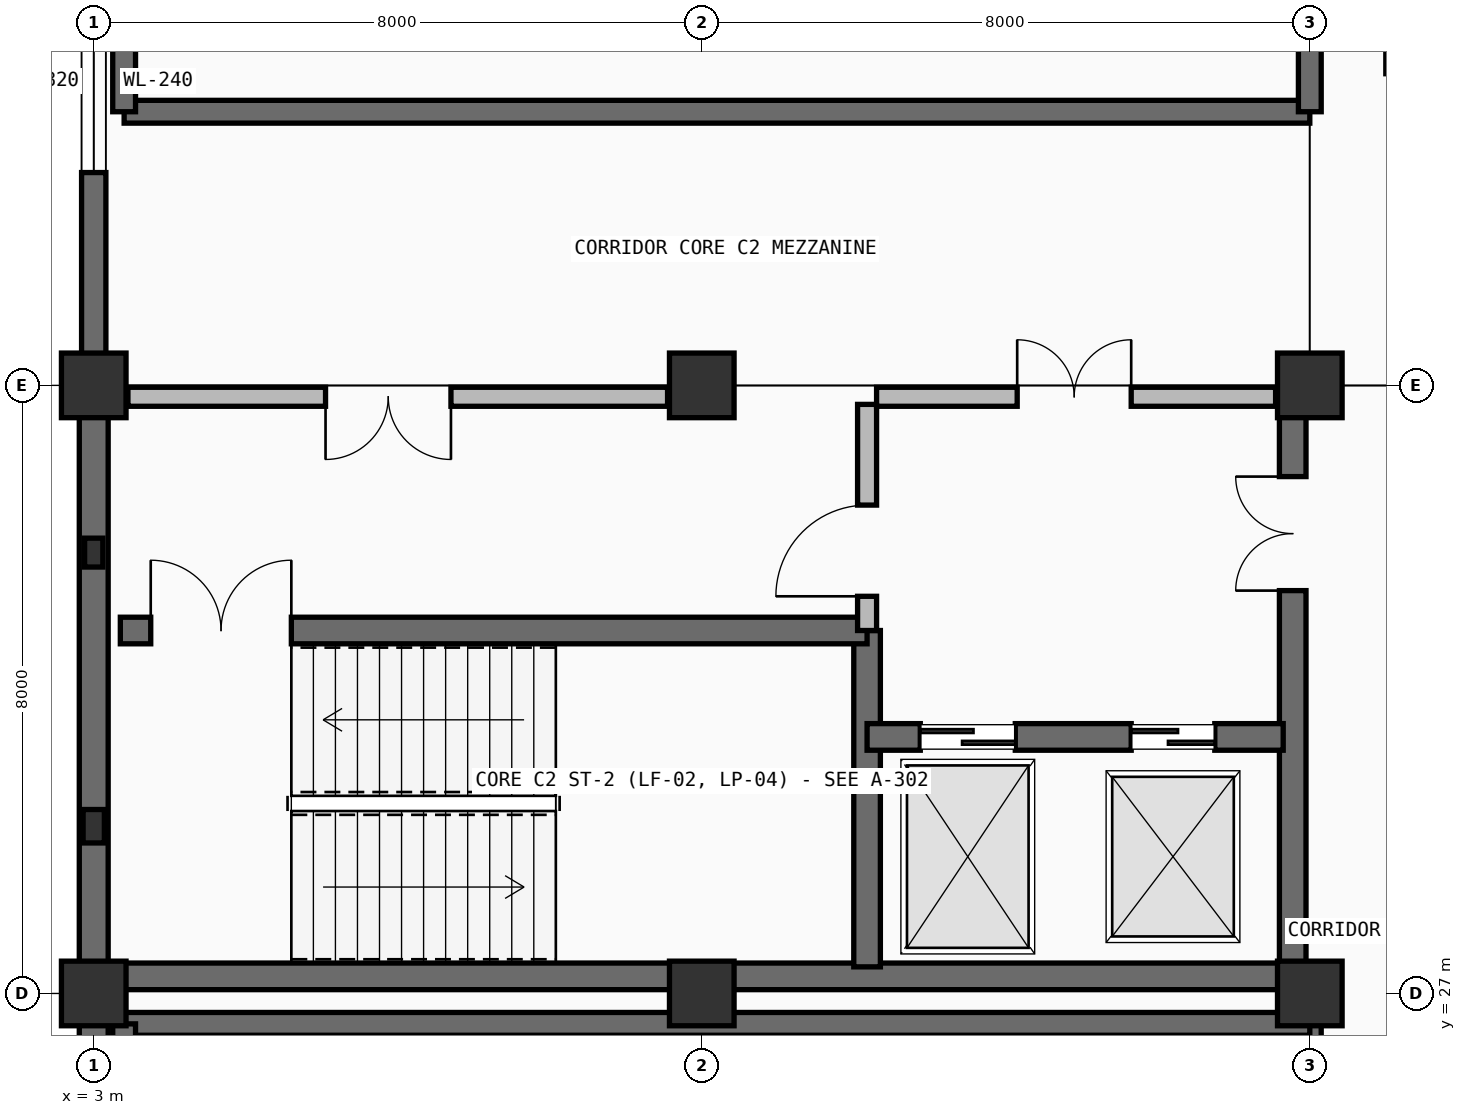
"""IFC4 building model, lengths in metres.
Left out: names, types, materials, properties, quantities, classifications, styles, units other than length and angle.
Written with IfcOpenShell. Run it as: python <this file> out.ifc"""

import sys

from ifc_helpers import new_model, si_unit, direction, frame, frame_2d, origin, origin_2d, place, context, subcontext, project, spatial, rectangle, extrude, element, fill, save


model = new_model("IFC4")
c1 = context("Model", 3, precision=1e-05, world=origin(), true_north=direction((0.0, 1.0)))
c2 = subcontext(c1, "Body", "Model", "MODEL_VIEW")
j1 = project(units=[si_unit("LENGTHUNIT", "METRE"), si_unit("PLANEANGLEUNIT", "RADIAN")], contexts=[c1])
p1 = place(None, origin())
s1 = spatial("IfcSite", under=j1, at=p1, CompositionType="ELEMENT")
p2 = place(p1, origin())
s2 = spatial("IfcBuilding", under=s1, at=p2, CompositionType="ELEMENT")
p3 = place(p2, frame((0.0, 0.0, 5.4)))
s3 = spatial("IfcBuildingStorey", under=s2, at=p3, CompositionType="ELEMENT", Elevation=5.4)
for number, where, z_axis, x_axis in (
    (1, (3.0, 27.0, 0.0), (0.0, 0.0, 1.0), (1.0, 0.0, 0.0)),
    (2, (3.0, 35.0, 0.0), (0.0, 0.0, 1.0), (1.0, 0.0, 0.0)),
    (3, (11.0, 27.0, 0.0), (0.0, 0.0, 1.0), (1.0, 0.0, 0.0)),
    (4, (11.0, 35.0, 0.0), (0.0, 0.0, 1.0), (1.0, 0.0, 0.0)),
    (5, (19.0, 27.0, 0.0), (0.0, 0.0, 1.0), (1.0, 0.0, 0.0)),
    (6, (19.0, 35.0, 0.0), (0.0, 0.0, 1.0), (1.0, 0.0, 0.0)),
):
    element("IfcColumn", number, at=place(p3, frame(where, z_axis=z_axis, x_axis=x_axis)), inside=s3, PredefinedType="COLUMN", context=c2, shape_type="SweptSolid", body=[
        extrude(rectangle(XDim=0.85, YDim=0.85, at=origin_2d()), origin(), (0.0, 0.0, 1.0), 4.5),
    ])
p4 = place(p3, frame((3.0, 29.2, 0.0), z_axis=(0.0, 0.0, 1.0), x_axis=(0.0, 1.0, 0.0)))
e7 = element("IfcColumn", 7, at=p4, inside=s3, PredefinedType="PILASTER", context=c2, shape_type="SweptSolid", body=[
    extrude(rectangle(XDim=0.44, YDim=0.28, at=origin_2d()), origin(), (0.0, 0.0, 1.0), 4.5),
])
p5 = place(p3, frame((3.0, 32.8, 0.0), z_axis=(0.0, 0.0, 1.0), x_axis=(0.0, 1.0, 0.0)))
e8 = element("IfcColumn", 8, at=p5, inside=s3, PredefinedType="PILASTER", context=c2, shape_type="SweptSolid", body=[
    extrude(rectangle(XDim=0.38, YDim=0.24, at=origin_2d()), origin(), (0.0, 0.0, 1.0), 4.5),
])
p6 = place(p3, frame((3.0, 19.0, 0.0), z_axis=(0.0, 0.0, 1.0), x_axis=(0.0, 1.0, 0.0)))
e9 = element("IfcWall", 9, at=p6, inside=s3, PredefinedType="SOLIDWALL", context=c2, shape_type="SweptSolid", body=[
    extrude(rectangle(XDim=8.0, YDim=0.38, at=frame_2d((4.0, 0.0))), origin(), (0.0, 0.0, 1.0), 4.5),
])
p7 = place(p6, frame((1.875, 0.0, 1.05)))
e10 = element("IfcOpeningElement", 10, at=p7, cuts=e9, PredefinedType="OPENING", context=c2, shape_type="SweptSolid", body=[
    extrude(rectangle(XDim=1.05, YDim=1.7, at=frame_2d((0.525, 0.85))), frame((0.0, 0.2, 0.0), z_axis=(0.0, -1.0, 0.0), x_axis=(1.0, 0.0, 0.0)), (0.0, 0.0, 1.0), 0.4),
])
p8 = place(p6, frame((5.15, 0.0, 1.05)))
e11 = element("IfcOpeningElement", 11, at=p8, cuts=e9, PredefinedType="OPENING", context=c2, shape_type="SweptSolid", body=[
    extrude(rectangle(XDim=0.9, YDim=1.5, at=frame_2d((0.45, 0.75))), frame((0.0, 0.2, 0.0), z_axis=(0.0, -1.0, 0.0), x_axis=(1.0, 0.0, 0.0)), (0.0, 0.0, 1.0), 0.4),
])
p9 = place(p3, frame((3.0, 27.0, 0.0), z_axis=(0.0, 0.0, 1.0), x_axis=(0.0, 1.0, 0.0)))
e12 = element("IfcWall", 12, at=p9, inside=s3, PredefinedType="SOLIDWALL", context=c2, shape_type="SweptSolid", body=[
    extrude(rectangle(XDim=8.0, YDim=0.38, at=frame_2d((4.0, 0.0))), origin(), (0.0, 0.0, 1.0), 4.5),
])
p10 = place(p3, frame((3.0, 35.0, 0.0), z_axis=(0.0, 0.0, 1.0), x_axis=(0.0, 1.0, 0.0)))
e13 = element("IfcWall", 13, at=p10, inside=s3, PredefinedType="SOLIDWALL", context=c2, shape_type="SweptSolid", body=[
    extrude(rectangle(XDim=8.0, YDim=0.32, at=frame_2d((4.0, 0.0))), origin(), (0.0, 0.0, 1.0), 4.5),
])
p11 = place(p10, frame((2.8, 0.0, 1.1)))
e14 = element("IfcOpeningElement", 14, at=p11, cuts=e13, PredefinedType="OPENING", context=c2, shape_type="SweptSolid", body=[
    extrude(rectangle(XDim=2.4, YDim=1.1, at=frame_2d((1.2, 0.55))), frame((0.0, 0.17, 0.0), z_axis=(0.0, -1.0, 0.0), x_axis=(1.0, 0.0, 0.0)), (0.0, 0.0, 1.0), 0.34),
])
p12 = place(p3, frame((3.2, 27.225, 0.0), z_axis=(0.0, 0.0, 1.0), x_axis=(1.0, 0.0, 0.0)))
e15 = element("IfcWall", 15, at=p12, inside=s3, PredefinedType="SHEAR", context=c2, shape_type="SweptSolid", body=[
    extrude(rectangle(XDim=15.6, YDim=0.35, at=frame_2d((7.8, 0.0))), origin(), (0.0, 0.0, 1.0), 4.2),
])
p13 = place(p3, frame((13.175, 27.35, 0.0), z_axis=(0.0, 0.0, 1.0), x_axis=(0.0, 1.0, 0.0)))
e16 = element("IfcWall", 16, at=p13, inside=s3, PredefinedType="SHEAR", context=c2, shape_type="SweptSolid", body=[
    extrude(rectangle(XDim=4.425, YDim=0.35, at=frame_2d((2.212, 0.0))), origin(), (0.0, 0.0, 1.0), 4.2),
])
p14 = place(p3, frame((18.775, 27.2, 0.0), z_axis=(0.0, 0.0, 1.0), x_axis=(0.0, 1.0, 0.0)))
e17 = element("IfcWall", 17, at=p14, inside=s3, PredefinedType="SHEAR", context=c2, shape_type="SweptSolid", body=[
    extrude(rectangle(XDim=7.6, YDim=0.35, at=frame_2d((3.8, 0.0))), origin(), (0.0, 0.0, 1.0), 4.2),
])
p15 = place(p14, frame((5.1, 0.0, 0.0)))
e18 = element("IfcOpeningElement", 18, at=p15, cuts=e17, PredefinedType="OPENING", context=c2, shape_type="SweptSolid", body=[
    extrude(rectangle(XDim=1.5, YDim=2.2, at=frame_2d((0.75, 1.1))), frame((0.0, 0.185, 0.0), z_axis=(0.0, -1.0, 0.0), x_axis=(1.0, 0.0, 0.0)), (0.0, 0.0, 1.0), 0.37),
])
p16 = place(p3, frame((3.35, 31.775, 0.0), z_axis=(0.0, 0.0, 1.0), x_axis=(1.0, 0.0, 0.0)))
e19 = element("IfcWall", 19, at=p16, inside=s3, PredefinedType="SHEAR", context=c2, shape_type="SweptSolid", body=[
    extrude(rectangle(XDim=9.825, YDim=0.35, at=frame_2d((4.913, 0.0))), origin(), (0.0, 0.0, 1.0), 4.2),
])
p17 = place(p16, frame((0.4, 0.0, 0.0)))
e20 = element("IfcOpeningElement", 20, at=p17, cuts=e19, PredefinedType="OPENING", context=c2, shape_type="SweptSolid", body=[
    extrude(rectangle(XDim=1.85, YDim=2.25, at=frame_2d((0.925, 1.125))), frame((0.0, 0.185, 0.0), z_axis=(0.0, -1.0, 0.0), x_axis=(1.0, 0.0, 0.0)), (0.0, 0.0, 1.0), 0.37),
])
p18 = place(p3, frame((13.175, 30.375, 0.0), z_axis=(0.0, 0.0, 1.0), x_axis=(1.0, 0.0, 0.0)))
e21 = element("IfcWall", 21, at=p18, inside=s3, PredefinedType="SHEAR", context=c2, shape_type="SweptSolid", body=[
    extrude(rectangle(XDim=5.475, YDim=0.35, at=frame_2d((2.737, 0.0))), origin(), (0.0, 0.0, 1.0), 4.2),
])
p19 = place(p18, frame((0.7, 0.0, 0.0)))
e22 = element("IfcOpeningElement", 22, at=p19, cuts=e21, PredefinedType="OPENING", context=c2, shape_type="SweptSolid", body=[
    extrude(rectangle(XDim=1.25, YDim=2.25, at=frame_2d((0.625, 1.125))), frame((0.0, 0.185, 0.0), z_axis=(0.0, -1.0, 0.0), x_axis=(1.0, 0.0, 0.0)), (0.0, 0.0, 1.0), 0.37),
])
p20 = place(p18, frame((3.475, 0.0, 0.0)))
e23 = element("IfcOpeningElement", 23, at=p20, cuts=e21, PredefinedType="OPENING", context=c2, shape_type="SweptSolid", body=[
    extrude(rectangle(XDim=1.1, YDim=2.2, at=frame_2d((0.55, 1.1))), frame((0.0, 0.185, 0.0), z_axis=(0.0, -1.0, 0.0), x_axis=(1.0, 0.0, 0.0)), (0.0, 0.0, 1.0), 0.37),
])
p21 = place(p3, frame((13.175, 31.775, 0.0), z_axis=(0.0, 0.0, 1.0), x_axis=(0.0, 1.0, 0.0)))
e24 = element("IfcWall", 24, at=p21, inside=s3, PredefinedType="PARTITIONING", context=c2, shape_type="SweptSolid", body=[
    extrude(rectangle(XDim=2.975, YDim=0.25, at=frame_2d((1.488, 0.0))), origin(), (0.0, 0.0, 1.0), 4.2),
])
p22 = place(p21, frame((0.45, 0.0, 0.0)))
e25 = element("IfcOpeningElement", 25, at=p22, cuts=e24, PredefinedType="OPENING", context=c2, shape_type="SweptSolid", body=[
    extrude(rectangle(XDim=1.2, YDim=2.2, at=frame_2d((0.6, 1.1))), frame((0.0, 0.135, 0.0), z_axis=(0.0, -1.0, 0.0), x_axis=(1.0, 0.0, 0.0)), (0.0, 0.0, 1.0), 0.27),
])
p23 = place(p3, frame((3.45, 34.85, 0.0), z_axis=(0.0, 0.0, 1.0), x_axis=(1.0, 0.0, 0.0)))
e26 = element("IfcWall", 26, at=p23, inside=s3, PredefinedType="PARTITIONING", context=c2, shape_type="SweptSolid", body=[
    extrude(rectangle(XDim=7.1, YDim=0.25, at=frame_2d((3.55, 0.0))), origin(), (0.0, 0.0, 1.0), 3.435),
])
p24 = place(p23, frame((2.6, 0.0, 0.0)))
e27 = element("IfcOpeningElement", 27, at=p24, cuts=e26, PredefinedType="OPENING", context=c2, shape_type="SweptSolid", body=[
    extrude(rectangle(XDim=1.65, YDim=2.25, at=frame_2d((0.825, 1.125))), frame((0.0, 0.135, 0.0), z_axis=(0.0, -1.0, 0.0), x_axis=(1.0, 0.0, 0.0)), (0.0, 0.0, 1.0), 0.27),
])
p25 = place(p3, frame((13.3, 34.85, 0.0), z_axis=(0.0, 0.0, 1.0), x_axis=(1.0, 0.0, 0.0)))
e28 = element("IfcWall", 28, at=p25, inside=s3, PredefinedType="PARTITIONING", context=c2, shape_type="SweptSolid", body=[
    extrude(rectangle(XDim=5.25, YDim=0.25, at=frame_2d((2.625, 0.0))), origin(), (0.0, 0.0, 1.0), 3.435),
])
p26 = place(p25, frame((1.85, 0.0, 0.0)))
e29 = element("IfcOpeningElement", 29, at=p26, cuts=e28, PredefinedType="OPENING", context=c2, shape_type="SweptSolid", body=[
    extrude(rectangle(XDim=1.5, YDim=2.2, at=frame_2d((0.75, 1.1))), frame((0.0, 0.135, 0.0), z_axis=(0.0, -1.0, 0.0), x_axis=(1.0, 0.0, 0.0)), (0.0, 0.0, 1.0), 0.27),
])
p27 = place(p3, frame((19.0, 14.6, 0.0), z_axis=(0.0, 0.0, 1.0), x_axis=(0.0, 1.0, 0.0)))
e30 = element("IfcWall", 30, at=p27, inside=s3, PredefinedType="SHEAR", context=c2, shape_type="SweptSolid", body=[
    extrude(rectangle(XDim=12.0, YDim=0.3, at=frame_2d((6.0, 0.0))), origin(), (0.0, 0.0, 1.0), 4.2),
])
p28 = place(p27, frame((7.9, 0.0, 0.0)))
e31 = element("IfcOpeningElement", 31, at=p28, cuts=e30, PredefinedType="OPENING", context=c2, shape_type="SweptSolid", body=[
    extrude(rectangle(XDim=1.05, YDim=2.16, at=frame_2d((0.525, 1.08))), frame((0.0, 0.16, 0.0), z_axis=(0.0, -1.0, 0.0), x_axis=(1.0, 0.0, 0.0)), (0.0, 0.0, 1.0), 0.32),
])
p29 = place(p3, frame((3.4, 26.6, 0.0), z_axis=(0.0, 0.0, 1.0), x_axis=(1.0, 0.0, 0.0)))
e32 = element("IfcWall", 32, at=p29, inside=s3, PredefinedType="SHEAR", context=c2, shape_type="SweptSolid", body=[
    extrude(rectangle(XDim=15.6, YDim=0.3, at=frame_2d((7.8, 0.0))), origin(), (0.0, 0.0, 1.0), 4.2),
])
p30 = place(p3, frame((3.4, 14.6, 0.0), z_axis=(0.0, 0.0, 1.0), x_axis=(0.0, 1.0, 0.0)))
e33 = element("IfcWall", 33, at=p30, inside=s3, PredefinedType="SHEAR", context=c2, shape_type="SweptSolid", body=[
    extrude(rectangle(XDim=12.0, YDim=0.3, at=frame_2d((6.0, 0.0))), origin(), (0.0, 0.0, 1.0), 4.2),
])
p31 = place(p3, frame((3.4, 38.6, 0.0), z_axis=(0.0, 0.0, 1.0), x_axis=(1.0, 0.0, 0.0)))
e34 = element("IfcWall", 34, at=p31, inside=s3, PredefinedType="SHEAR", context=c2, shape_type="SweptSolid", body=[
    extrude(rectangle(XDim=15.6, YDim=0.3, at=frame_2d((7.8, 0.0))), origin(), (0.0, 0.0, 1.0), 4.2),
])
p32 = place(p3, frame((19.0, 38.6, 0.0), z_axis=(0.0, 0.0, 1.0), x_axis=(0.0, 1.0, 0.0)))
e35 = element("IfcWall", 35, at=p32, inside=s3, PredefinedType="SHEAR", context=c2, shape_type="SweptSolid", body=[
    extrude(rectangle(XDim=25.0, YDim=0.3, at=frame_2d((12.5, 0.0))), origin(), (0.0, 0.0, 1.0), 4.2),
])
p33 = place(p32, frame((15.484, 0.0, 0.0)))
e36 = element("IfcOpeningElement", 36, at=p33, cuts=e35, PredefinedType="OPENING", context=c2, shape_type="SweptSolid", body=[
    extrude(rectangle(XDim=1.85, YDim=2.25, at=frame_2d((0.925, 1.125))), frame((0.0, 0.16, 0.0), z_axis=(0.0, -1.0, 0.0), x_axis=(1.0, 0.0, 0.0)), (0.0, 0.0, 1.0), 0.32),
])
p34 = place(p3, frame((3.4, 38.6, 0.0), z_axis=(0.0, 0.0, 1.0), x_axis=(0.0, 1.0, 0.0)))
e37 = element("IfcWall", 37, at=p34, inside=s3, PredefinedType="SHEAR", context=c2, shape_type="SweptSolid", body=[
    extrude(rectangle(XDim=25.0, YDim=0.3, at=frame_2d((12.5, 0.0))), origin(), (0.0, 0.0, 1.0), 4.2),
])
p35 = place(p11, origin())
e38 = element("IfcWindow", 38, at=p35, inside=s3, PartitioningType="SINGLE_PANEL", PredefinedType="WINDOW", context=c2, shape_type="SweptSolid", body=[
    extrude(rectangle(XDim=2.4, YDim=1.1, at=frame_2d((1.2, 0.55))), frame((0.0, 0.03, 0.0), z_axis=(0.0, -1.0, 0.0), x_axis=(1.0, 0.0, 0.0)), (0.0, 0.0, 1.0), 0.06),
])
fill(e14, e38)
p36 = place(p17, origin())
e39 = element("IfcDoor", 39, at=p36, inside=s3, OperationType="DOUBLE_DOOR_SINGLE_SWING", PredefinedType="DOOR", context=c2, shape_type="SweptSolid", body=[
    extrude(rectangle(XDim=1.85, YDim=2.25, at=frame_2d((0.925, 1.125))), frame((0.0, 0.025, 0.0), z_axis=(0.0, -1.0, 0.0), x_axis=(1.0, 0.0, 0.0)), (0.0, 0.0, 1.0), 0.05),
])
fill(e20, e39)
p37 = place(p19, origin())
e40 = element("IfcDoor", 40, at=p37, inside=s3, OperationType="DOUBLE_DOOR_SLIDING", PredefinedType="DOOR", context=c2, shape_type="SweptSolid", body=[
    extrude(rectangle(XDim=1.25, YDim=2.25, at=frame_2d((0.625, 1.125))), frame((0.0, 0.025, 0.0), z_axis=(0.0, -1.0, 0.0), x_axis=(1.0, 0.0, 0.0)), (0.0, 0.0, 1.0), 0.05),
])
fill(e22, e40)
p38 = place(p20, origin())
e41 = element("IfcDoor", 41, at=p38, inside=s3, OperationType="DOUBLE_DOOR_SLIDING", PredefinedType="DOOR", context=c2, shape_type="SweptSolid", body=[
    extrude(rectangle(XDim=1.1, YDim=2.2, at=frame_2d((0.55, 1.1))), frame((0.0, 0.025, 0.0), z_axis=(0.0, -1.0, 0.0), x_axis=(1.0, 0.0, 0.0)), (0.0, 0.0, 1.0), 0.05),
])
fill(e23, e41)
p39 = place(p22, origin())
e42 = element("IfcDoor", 42, at=p39, inside=s3, OperationType="SINGLE_SWING_LEFT", PredefinedType="DOOR", context=c2, shape_type="SweptSolid", body=[
    extrude(rectangle(XDim=1.2, YDim=2.2, at=frame_2d((0.6, 1.1))), frame((0.0, 0.025, 0.0), z_axis=(0.0, -1.0, 0.0), x_axis=(1.0, 0.0, 0.0)), (0.0, 0.0, 1.0), 0.05),
])
fill(e25, e42)
p40 = place(p24, frame((1.65, 0.0, 0.0), z_axis=(0.0, 0.0, 1.0), x_axis=(-1.0, 0.0, 0.0)))
e43 = element("IfcDoor", 43, at=p40, inside=s3, OperationType="DOUBLE_DOOR_SINGLE_SWING", PredefinedType="DOOR", context=c2, shape_type="SweptSolid", body=[
    extrude(rectangle(XDim=1.65, YDim=2.25, at=frame_2d((0.825, 1.125))), frame((0.0, 0.025, 0.0), z_axis=(0.0, -1.0, 0.0), x_axis=(1.0, 0.0, 0.0)), (0.0, 0.0, 1.0), 0.05),
])
fill(e27, e43)
p41 = place(p26, origin())
e44 = element("IfcDoor", 44, at=p41, inside=s3, OperationType="DOUBLE_DOOR_SINGLE_SWING", PredefinedType="DOOR", context=c2, shape_type="SweptSolid", body=[
    extrude(rectangle(XDim=1.5, YDim=2.2, at=frame_2d((0.75, 1.1))), frame((0.0, 0.025, 0.0), z_axis=(0.0, -1.0, 0.0), x_axis=(1.0, 0.0, 0.0)), (0.0, 0.0, 1.0), 0.05),
])
fill(e29, e44)
p42 = place(p15, origin())
e45 = element("IfcDoor", 45, at=p42, inside=s3, OperationType="DOUBLE_DOOR_SINGLE_SWING", PredefinedType="DOOR", context=c2, shape_type="SweptSolid", body=[
    extrude(rectangle(XDim=1.5, YDim=2.2, at=frame_2d((0.75, 1.1))), frame((0.0, 0.025, 0.0), z_axis=(0.0, -1.0, 0.0), x_axis=(1.0, 0.0, 0.0)), (0.0, 0.0, 1.0), 0.05),
])
fill(e18, e45)
save(model, sys.argv[1])
